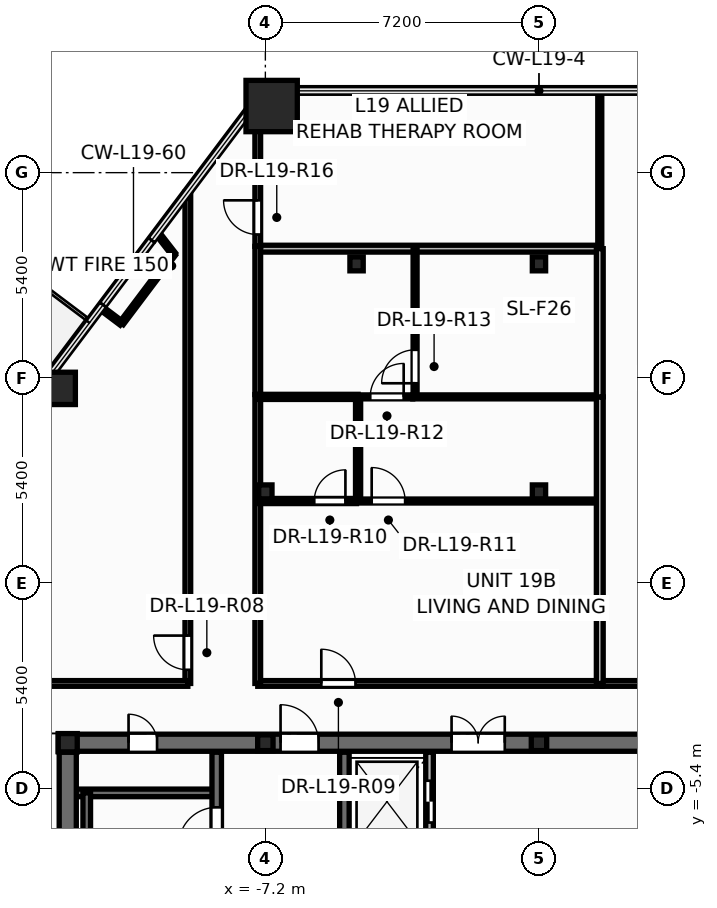
"""IFC4 building model, lengths in metres.
Left out: names, types, materials, properties, quantities, classifications, styles, units other than length and angle.
Written with IfcOpenShell. Run it as: python <this file> out.ifc"""

import sys

from ifc_helpers import new_model, si_unit, direction, frame, frame_2d, origin, origin_2d, place, context, subcontext, project, spatial, rectangle, hollow_rectangle, hollow_circle, i_section, extrude, element, fill, save


model = new_model("IFC4")
c1 = context("Model", 3, precision=1e-05, world=origin(), true_north=direction((0.0, 1.0)))
c2 = subcontext(c1, "Body", "Model", "MODEL_VIEW")
j1 = project(units=[si_unit("LENGTHUNIT", "METRE"), si_unit("PLANEANGLEUNIT", "RADIAN")], contexts=[c1])
p1 = place(None, origin())
s1 = spatial("IfcSite", under=j1, at=p1, CompositionType="ELEMENT")
p2 = place(p1, origin())
s2 = spatial("IfcBuilding", under=s1, at=p2, CompositionType="ELEMENT")
p3 = place(p2, frame((0.0, 0.0, 75.6)))
s3 = spatial("IfcBuildingStorey", under=s2, at=p3, CompositionType="ELEMENT", Elevation=75.6)
p4 = place(p3, frame((-7.034, 12.553, 0.0), z_axis=(0.0, 0.0, 1.0), x_axis=(1.0, 0.0, 0.0)))
e1 = element("IfcColumn", 1, at=p4, inside=s3, PredefinedType="COLUMN", context=c2, shape_type="SweptSolid", body=[
    extrude(hollow_rectangle(XDim=1.35, YDim=1.35, WallThickness=0.065, at=origin_2d()), origin(), (0.0, 0.0, 1.0), 3.6),
])
p5 = place(p3, frame((-12.624, 5.124, 0.0), z_axis=(0.0, 0.0, 1.0), x_axis=(1.0, 0.0, 0.0)))
e2 = element("IfcColumn", 2, at=p5, inside=s3, PredefinedType="COLUMN", context=c2, shape_type="SweptSolid", body=[
    extrude(hollow_circle(Radius=0.425, WallThickness=0.038, at=origin_2d()), origin(), (0.0, 0.0, 1.0), 3.6),
])
p6 = place(p3, frame((-12.4, -4.2, 0.0), z_axis=(0.0, 0.0, 1.0), x_axis=(1.0, 0.0, 0.0)))
e3 = element("IfcColumn", 3, at=p6, inside=s3, PredefinedType="COLUMN", context=c2, shape_type="SweptSolid", body=[
    extrude(i_section(OverallWidth=0.5, OverallDepth=0.482, WebThickness=0.04, FlangeThickness=0.045, at=origin_2d()), origin(), (0.0, 0.0, 1.0), 3.6),
])
for number, where, z_axis, x_axis in (
    (4, (-7.2, -4.2, 0.0), (0.0, 0.0, 1.0), (1.0, 0.0, 0.0)),
    (5, (0.0, -4.2, 0.0), (0.0, 0.0, 1.0), (1.0, 0.0, 0.0)),
):
    element("IfcColumn", number, at=place(p3, frame(where, z_axis=z_axis, x_axis=x_axis)), inside=s3, PredefinedType="PILASTER", context=c2, shape_type="SweptSolid", body=[
        extrude(i_section(OverallWidth=0.405, OverallDepth=0.414, WebThickness=0.022, FlangeThickness=0.032, at=origin_2d()), origin(), (0.0, 0.0, 1.0), 3.6),
    ])
for number, where, z_axis, x_axis in (
    (6, (-7.2, 2.4, 0.0), (0.0, 0.0, 1.0), (1.0, 0.0, 0.0)),
    (7, (0.0, 2.4, 0.0), (0.0, 0.0, 1.0), (1.0, 0.0, 0.0)),
    (8, (-4.8, 8.4, 0.0), (0.0, 0.0, 1.0), (1.0, 0.0, 0.0)),
    (9, (0.0, 8.4, 0.0), (0.0, 0.0, 1.0), (1.0, 0.0, 0.0)),
):
    element("IfcColumn", number, at=place(p3, frame(where, z_axis=z_axis, x_axis=x_axis)), inside=s3, PredefinedType="COLUMN", context=c2, shape_type="SweptSolid", body=[
        extrude(i_section(OverallWidth=0.35, OverallDepth=0.367, WebThickness=0.025, FlangeThickness=0.032, at=origin_2d()), origin(), (0.0, 0.0, 1.0), 3.6),
    ])
p7 = place(p3, frame((-12.65, -4.2, 0.0), z_axis=(0.0, 0.0, 1.0), x_axis=(1.0, 0.0, 0.0)))
e10 = element("IfcWall", 10, at=p7, inside=s3, PredefinedType="SHEAR", context=c2, shape_type="SweptSolid", body=[
    extrude(rectangle(XDim=25.3, YDim=0.45, at=frame_2d((12.65, 0.0))), origin(), (0.0, 0.0, 1.0), 3.6),
])
p8 = place(p7, frame((1.85, 0.0, 0.0)))
e11 = element("IfcOpeningElement", 11, at=p8, cuts=e10, PredefinedType="OPENING", context=c2, shape_type="SweptSolid", body=[
    extrude(rectangle(XDim=0.756, YDim=2.054, at=frame_2d((0.375, 1.027))), frame((0.0, 0.235, 0.0), z_axis=(0.0, -1.0, 0.0), x_axis=(1.0, 0.0, 0.0)), (0.0, 0.0, 1.0), 0.47),
])
p9 = place(p7, frame((21.85, 0.0, 0.0)))
e12 = element("IfcOpeningElement", 12, at=p9, cuts=e10, PredefinedType="OPENING", context=c2, shape_type="SweptSolid", body=[
    extrude(rectangle(XDim=0.756, YDim=2.054, at=frame_2d((0.375, 1.027))), frame((0.0, 0.235, 0.0), z_axis=(0.0, -1.0, 0.0), x_axis=(1.0, 0.0, 0.0)), (0.0, 0.0, 1.0), 0.47),
])
p10 = place(p7, frame((23.5, 0.0, 0.0)))
e13 = element("IfcOpeningElement", 13, at=p10, cuts=e10, PredefinedType="OPENING", context=c2, shape_type="SweptSolid", body=[
    extrude(rectangle(XDim=0.756, YDim=2.054, at=frame_2d((0.375, 1.027))), frame((0.0, 0.235, 0.0), z_axis=(0.0, -1.0, 0.0), x_axis=(1.0, 0.0, 0.0)), (0.0, 0.0, 1.0), 0.47),
])
p11 = place(p7, frame((5.85, 0.0, 0.0)))
e14 = element("IfcOpeningElement", 14, at=p11, cuts=e10, PredefinedType="OPENING", context=c2, shape_type="SweptSolid", body=[
    extrude(rectangle(XDim=1.006, YDim=2.104, at=frame_2d((0.5, 1.052))), frame((0.0, 0.235, 0.0), z_axis=(0.0, -1.0, 0.0), x_axis=(1.0, 0.0, 0.0)), (0.0, 0.0, 1.0), 0.47),
])
p12 = place(p7, frame((10.35, 0.0, 0.0)))
e15 = element("IfcOpeningElement", 15, at=p12, cuts=e10, PredefinedType="OPENING", context=c2, shape_type="SweptSolid", body=[
    extrude(rectangle(XDim=1.406, YDim=2.154, at=frame_2d((0.7, 1.077))), frame((0.0, 0.235, 0.0), z_axis=(0.0, -1.0, 0.0), x_axis=(1.0, 0.0, 0.0)), (0.0, 0.0, 1.0), 0.47),
])
p13 = place(p7, frame((18.45, 0.0, 0.0)))
e16 = element("IfcOpeningElement", 16, at=p13, cuts=e10, PredefinedType="OPENING", context=c2, shape_type="SweptSolid", body=[
    extrude(rectangle(XDim=1.006, YDim=2.104, at=frame_2d((0.5, 1.052))), frame((0.0, 0.235, 0.0), z_axis=(0.0, -1.0, 0.0), x_axis=(1.0, 0.0, 0.0)), (0.0, 0.0, 1.0), 0.47),
])
p14 = place(p3, frame((-12.35, -5.52, 0.0), z_axis=(0.0, 0.0, 1.0), x_axis=(1.0, 0.0, 0.0)))
e17 = element("IfcWall", 17, at=p14, inside=s3, PredefinedType="SOLIDWALL", context=c2, shape_type="SweptSolid", body=[
    extrude(rectangle(XDim=3.87, YDim=0.2, at=frame_2d((1.935, 0.0))), origin(), (0.0, 0.0, 1.0), 3.6),
])
p15 = place(p3, frame((-11.9, -13.1, 0.0), z_axis=(0.0, 0.0, 1.0), x_axis=(0.0, 1.0, 0.0)))
e18 = element("IfcWall", 18, at=p15, inside=s3, PredefinedType="SOLIDWALL", context=c2, shape_type="SweptSolid", body=[
    extrude(rectangle(XDim=7.58, YDim=0.2, at=frame_2d((3.79, 0.0))), origin(), (0.0, 0.0, 1.0), 3.6),
])
p16 = place(p3, frame((-8.48, -13.85, 0.0), z_axis=(0.0, 0.0, 1.0), x_axis=(0.0, 1.0, 0.0)))
e19 = element("IfcWall", 19, at=p16, inside=s3, PredefinedType="SHEAR", context=c2, shape_type="SweptSolid", body=[
    extrude(rectangle(XDim=9.4, YDim=0.25, at=frame_2d((4.7, 0.0))), origin(), (0.0, 0.0, 1.0), 3.6),
])
p17 = place(p16, frame((6.95, 0.0, 0.0)))
e20 = element("IfcOpeningElement", 20, at=p17, cuts=e19, PredefinedType="OPENING", context=c2, shape_type="SweptSolid", body=[
    extrude(rectangle(XDim=1.006, YDim=2.104, at=frame_2d((0.5, 1.052))), frame((0.0, 0.135, 0.0), z_axis=(0.0, -1.0, 0.0), x_axis=(1.0, 0.0, 0.0)), (0.0, 0.0, 1.0), 0.27),
])
p18 = place(p3, frame((-5.12, -13.85, 0.0), z_axis=(0.0, 0.0, 1.0), x_axis=(0.0, 1.0, 0.0)))
e21 = element("IfcWall", 21, at=p18, inside=s3, PredefinedType="SHEAR", context=c2, shape_type="SweptSolid", body=[
    extrude(rectangle(XDim=9.4, YDim=0.25, at=frame_2d((4.7, 0.0))), origin(), (0.0, 0.0, 1.0), 3.6),
])
p19 = place(p3, frame((-12.4, -13.85, 0.0), z_axis=(0.0, 0.0, 1.0), x_axis=(0.0, 1.0, 0.0)))
e22 = element("IfcWall", 22, at=p19, inside=s3, PredefinedType="SHEAR", context=c2, shape_type="SweptSolid", body=[
    extrude(rectangle(XDim=9.4, YDim=0.45, at=frame_2d((4.7, 0.0))), origin(), (0.0, 0.0, 1.0), 3.6),
])
p20 = place(p3, frame((-2.88, -9.45, 0.0), z_axis=(0.0, 0.0, 1.0), x_axis=(0.0, 1.0, 0.0)))
e23 = element("IfcWall", 23, at=p20, inside=s3, PredefinedType="SOLIDWALL", context=c2, shape_type="SweptSolid", body=[
    extrude(rectangle(XDim=5.0, YDim=0.2, at=frame_2d((2.5, 0.0))), origin(), (0.0, 0.0, 1.0), 3.35),
])
p21 = place(p20, frame((0.7, 0.0, 0.0)))
e24 = element("IfcOpeningElement", 24, at=p21, cuts=e23, PredefinedType="OPENING", context=c2, shape_type="SweptSolid", body=[
    extrude(rectangle(XDim=1.106, YDim=2.104, at=frame_2d((0.55, 1.052))), frame((0.0, 0.11, 0.0), z_axis=(0.0, -1.0, 0.0), x_axis=(1.0, 0.0, 0.0)), (0.0, 0.0, 1.0), 0.22),
])
p22 = place(p20, frame((3.15, 0.0, 0.0)))
e25 = element("IfcOpeningElement", 25, at=p22, cuts=e23, PredefinedType="OPENING", context=c2, shape_type="SweptSolid", body=[
    extrude(rectangle(XDim=1.106, YDim=2.104, at=frame_2d((0.55, 1.052))), frame((0.0, 0.11, 0.0), z_axis=(0.0, -1.0, 0.0), x_axis=(1.0, 0.0, 0.0)), (0.0, 0.0, 1.0), 0.22),
])
p23 = place(p3, frame((-9.24, -2.64, 0.0), z_axis=(0.0, 0.0, 1.0), x_axis=(0.0, 1.0, 0.0)))
e26 = element("IfcWall", 26, at=p23, inside=s3, PredefinedType="PARTITIONING", context=c2, shape_type="SweptSolid", body=[
    extrude(rectangle(XDim=12.927, YDim=0.15, at=frame_2d((6.463, 0.0))), origin(), (0.0, 0.0, 1.0), 2.509),
])
p24 = place(p23, frame((0.359, 0.0, 0.0)))
e27 = element("IfcOpeningElement", 27, at=p24, cuts=e26, PredefinedType="OPENING", context=c2, shape_type="SweptSolid", body=[
    extrude(rectangle(XDim=0.906, YDim=2.104, at=frame_2d((0.45, 1.052))), frame((0.0, 0.085, 0.0), z_axis=(0.0, -1.0, 0.0), x_axis=(1.0, 0.0, 0.0)), (0.0, 0.0, 1.0), 0.17),
])
p25 = place(p3, frame((-7.4, -2.64, 0.0), z_axis=(0.0, 0.0, 1.0), x_axis=(1.0, 0.0, 0.0)))
e28 = element("IfcWall", 28, at=p25, inside=s3, PredefinedType="PARTITIONING", context=c2, shape_type="SweptSolid", body=[
    extrude(rectangle(XDim=9.06, YDim=0.15, at=frame_2d((4.53, 0.0))), origin(), (0.0, 0.0, 1.0), 2.325),
])
p26 = place(p25, frame((1.672, 0.0, 0.0)))
e29 = element("IfcOpeningElement", 29, at=p26, cuts=e28, PredefinedType="OPENING", context=c2, shape_type="SweptSolid", body=[
    extrude(rectangle(XDim=0.906, YDim=2.104, at=frame_2d((0.45, 1.052))), frame((0.0, 0.085, 0.0), z_axis=(0.0, -1.0, 0.0), x_axis=(1.0, 0.0, 0.0)), (0.0, 0.0, 1.0), 0.17),
])
p27 = place(p3, frame((-4.8, 2.16, 0.0), z_axis=(0.0, 0.0, 1.0), x_axis=(1.0, 0.0, 0.0)))
e30 = element("IfcWall", 30, at=p27, inside=s3, PredefinedType="PARTITIONING", context=c2, shape_type="SweptSolid", body=[
    extrude(rectangle(XDim=6.4, YDim=0.105, at=frame_2d((3.2, 0.0))), origin(), (0.0, 0.0, 1.0), 2.325),
])
p28 = place(p27, frame((0.398, 0.0, 0.0)))
e31 = element("IfcOpeningElement", 31, at=p28, cuts=e30, PredefinedType="OPENING", context=c2, shape_type="SweptSolid", body=[
    extrude(rectangle(XDim=0.886, YDim=2.104, at=frame_2d((0.44, 1.052))), frame((0.0, 0.062, 0.0), z_axis=(0.0, -1.0, 0.0), x_axis=(1.0, 0.0, 0.0)), (0.0, 0.0, 1.0), 0.125),
])
p29 = place(p3, frame((1.662, -2.64, 0.0), z_axis=(0.0, 0.0, 1.0), x_axis=(1.0, 0.0, 0.0)))
e32 = element("IfcWall", 32, at=p29, inside=s3, PredefinedType="PARTITIONING", context=c2, shape_type="SweptSolid", body=[
    extrude(rectangle(XDim=6.178, YDim=0.15, at=frame_2d((3.089, 0.0))), origin(), (0.0, 0.0, 1.0), 2.325),
])
p30 = place(p3, frame((-14.64, -2.64, 0.0), z_axis=(0.0, 0.0, 1.0), x_axis=(1.0, 0.0, 0.0)))
e33 = element("IfcWall", 33, at=p30, inside=s3, PredefinedType="PARTITIONING", context=c2, shape_type="SweptSolid", body=[
    extrude(rectangle(XDim=5.4, YDim=0.15, at=frame_2d((2.7, 0.0))), origin(), (0.0, 0.0, 1.0), 3.35),
])
p31 = place(p3, frame((-3.32, 4.9, 0.0), z_axis=(0.0, 0.0, 1.0), x_axis=(1.0, 0.0, 0.0)))
e34 = element("IfcWall", 34, at=p31, inside=s3, PredefinedType="PARTITIONING", context=c2, shape_type="SweptSolid", body=[
    extrude(rectangle(XDim=4.92, YDim=0.105, at=frame_2d((2.46, 0.0))), origin(), (0.0, 0.0, 1.0), 2.325),
])
p32 = place(p3, frame((-7.4, 8.8, 0.0), z_axis=(0.0, 0.0, 1.0), x_axis=(1.0, 0.0, 0.0)))
e35 = element("IfcWall", 35, at=p32, inside=s3, PredefinedType="PARTITIONING", context=c2, shape_type="SweptSolid", body=[
    extrude(rectangle(XDim=9.0, YDim=0.18, at=frame_2d((4.5, 0.0))), origin(), (0.0, 0.0, 1.0), 2.509),
])
p33 = place(p3, frame((-7.4, -2.64, 0.0), z_axis=(0.0, 0.0, 1.0), x_axis=(0.0, 1.0, 0.0)))
e36 = element("IfcWall", 36, at=p33, inside=s3, PredefinedType="PARTITIONING", context=c2, shape_type="SweptSolid", body=[
    extrude(rectangle(XDim=7.6, YDim=0.15, at=frame_2d((3.8, 0.0))), origin(), (0.0, 0.0, 1.0), 2.325),
])
p34 = place(p3, frame((1.6, -2.64, 0.0), z_axis=(0.0, 0.0, 1.0), x_axis=(0.0, 1.0, 0.0)))
e37 = element("IfcWall", 37, at=p34, inside=s3, PredefinedType="PARTITIONING", context=c2, shape_type="SweptSolid", body=[
    extrude(rectangle(XDim=7.54, YDim=0.18, at=frame_2d((3.77, 0.0))), origin(), (0.0, 0.0, 1.0), 2.325),
])
p35 = place(p3, frame((1.6, 8.74, 0.0), z_axis=(0.0, 0.0, 1.0), x_axis=(0.0, 1.0, 0.0)))
e38 = element("IfcWall", 38, at=p35, inside=s3, PredefinedType="PARTITIONING", context=c2, shape_type="SweptSolid", body=[
    extrude(rectangle(XDim=4.213, YDim=0.105, at=frame_2d((2.106, 0.0))), origin(), (0.0, 0.0, 1.0), 2.713),
])
p36 = place(p3, frame((-7.4, 4.962, 0.0), z_axis=(0.0, 0.0, 1.0), x_axis=(0.0, 1.0, 0.0)))
e39 = element("IfcWall", 39, at=p36, inside=s3, PredefinedType="PARTITIONING", context=c2, shape_type="SweptSolid", body=[
    extrude(rectangle(XDim=3.898, YDim=0.15, at=frame_2d((1.949, 0.0))), origin(), (0.0, 0.0, 1.0), 2.509),
])
p37 = place(p3, frame((-7.4, 8.862, 0.0), z_axis=(0.0, 0.0, 1.0), x_axis=(0.0, 1.0, 0.0)))
e40 = element("IfcWall", 40, at=p37, inside=s3, PredefinedType="PARTITIONING", context=c2, shape_type="SweptSolid", body=[
    extrude(rectangle(XDim=3.87, YDim=0.15, at=frame_2d((1.935, 0.0))), origin(), (0.0, 0.0, 1.0), 2.713),
])
p38 = place(p37, frame((0.31, 0.0, 0.0)))
e41 = element("IfcOpeningElement", 41, at=p38, cuts=e40, PredefinedType="OPENING", context=c2, shape_type="SweptSolid", body=[
    extrude(rectangle(XDim=0.906, YDim=2.104, at=frame_2d((0.45, 1.052))), frame((0.0, 0.085, 0.0), z_axis=(0.0, -1.0, 0.0), x_axis=(1.0, 0.0, 0.0)), (0.0, 0.0, 1.0), 0.17),
])
p39 = place(p3, frame((-3.26, 4.9, 0.0), z_axis=(0.0, 0.0, 1.0), x_axis=(0.0, 1.0, 0.0)))
e42 = element("IfcWall", 42, at=p39, inside=s3, PredefinedType="PARTITIONING", context=c2, shape_type="SweptSolid", body=[
    extrude(rectangle(XDim=3.9, YDim=0.105, at=frame_2d((1.95, 0.0))), origin(), (0.0, 0.0, 1.0), 2.509),
])
p40 = place(p39, frame((0.358, 0.0, 0.0)))
e43 = element("IfcOpeningElement", 43, at=p40, cuts=e42, PredefinedType="OPENING", context=c2, shape_type="SweptSolid", body=[
    extrude(rectangle(XDim=0.886, YDim=2.104, at=frame_2d((0.44, 1.052))), frame((0.0, 0.062, 0.0), z_axis=(0.0, -1.0, 0.0), x_axis=(1.0, 0.0, 0.0)), (0.0, 0.0, 1.0), 0.125),
])
p41 = place(p3, frame((1.6, 4.9, 0.0), z_axis=(0.0, 0.0, 1.0), x_axis=(0.0, 1.0, 0.0)))
e44 = element("IfcWall", 44, at=p41, inside=s3, PredefinedType="PARTITIONING", context=c2, shape_type="SweptSolid", body=[
    extrude(rectangle(XDim=3.9, YDim=0.18, at=frame_2d((1.95, 0.0))), origin(), (0.0, 0.0, 1.0), 2.509),
])
p42 = place(p3, frame((-4.76, 2.16, 0.0), z_axis=(0.0, 0.0, 1.0), x_axis=(0.0, 1.0, 0.0)))
e45 = element("IfcWall", 45, at=p42, inside=s3, PredefinedType="PARTITIONING", context=c2, shape_type="SweptSolid", body=[
    extrude(rectangle(XDim=2.74, YDim=0.135, at=frame_2d((1.37, 0.0))), origin(), (0.0, 0.0, 1.0), 2.325),
])
p43 = place(p3, frame((-7.4, 2.16, 0.0), z_axis=(0.0, 0.0, 1.0), x_axis=(1.0, 0.0, 0.0)))
e46 = element("IfcWall", 46, at=p43, inside=s3, PredefinedType="PARTITIONING", context=c2, shape_type="SweptSolid", body=[
    extrude(rectangle(XDim=2.598, YDim=0.135, at=frame_2d((1.299, 0.0))), origin(), (0.0, 0.0, 1.0), 2.325),
])
p44 = place(p43, frame((1.487, 0.0, 0.0)))
e47 = element("IfcOpeningElement", 47, at=p44, cuts=e46, PredefinedType="OPENING", context=c2, shape_type="SweptSolid", body=[
    extrude(rectangle(XDim=0.826, YDim=2.104, at=frame_2d((0.41, 1.052))), frame((0.0, 0.078, 0.0), z_axis=(0.0, -1.0, 0.0), x_axis=(1.0, 0.0, 0.0)), (0.0, 0.0, 1.0), 0.155),
])
p45 = place(p3, frame((-7.4, 4.9, 0.0), z_axis=(0.0, 0.0, 1.0), x_axis=(1.0, 0.0, 0.0)))
e48 = element("IfcWall", 48, at=p45, inside=s3, PredefinedType="PARTITIONING", context=c2, shape_type="SweptSolid", body=[
    extrude(rectangle(XDim=2.64, YDim=0.135, at=frame_2d((1.32, 0.0))), origin(), (0.0, 0.0, 1.0), 2.509),
])
p46 = place(p3, frame((-9.615, 8.657, 0.0), z_axis=(0.0, 0.0, 1.0), x_axis=(-0.601301632327, -0.799022119194, 0.0)))
e49 = element("IfcWall", 49, at=p46, inside=s3, PredefinedType="PARTITIONING", context=c2, shape_type="SweptSolid", body=[
    extrude(rectangle(XDim=2.279, YDim=0.12, at=frame_2d((1.14, 0.0))), origin(), (0.0, 0.0, 1.0), 3.35),
])
p47 = place(p3, frame((-4.76, 4.9, 0.0), z_axis=(0.0, 0.0, 1.0), x_axis=(1.0, 0.0, 0.0)))
e50 = element("IfcWall", 50, at=p47, inside=s3, PredefinedType="PARTITIONING", context=c2, shape_type="SweptSolid", body=[
    extrude(rectangle(XDim=1.438, YDim=0.105, at=frame_2d((0.719, 0.0))), origin(), (0.0, 0.0, 1.0), 3.35),
])
p48 = place(p47, frame((0.32, 0.0, 0.0)))
e51 = element("IfcOpeningElement", 51, at=p48, cuts=e50, PredefinedType="OPENING", context=c2, shape_type="SweptSolid", body=[
    extrude(rectangle(XDim=0.886, YDim=2.104, at=frame_2d((0.44, 1.052))), frame((0.0, 0.062, 0.0), z_axis=(0.0, -1.0, 0.0), x_axis=(1.0, 0.0, 0.0)), (0.0, 0.0, 1.0), 0.125),
])
p49 = place(p3, frame((-10.041, 9.206, 0.0), z_axis=(0.0, 0.0, 1.0), x_axis=(0.613137094739, -0.789976520572, 0.0)))
e52 = element("IfcWall", 52, at=p49, inside=s3, PredefinedType="PARTITIONING", context=c2, shape_type="SweptSolid", body=[
    extrude(rectangle(XDim=0.694, YDim=0.12, at=frame_2d((0.347, 0.0))), origin(), (0.0, 0.0, 1.0), 2.713),
])
p50 = place(p3, frame((-10.986, 6.836, 0.0), z_axis=(0.0, 0.0, 1.0), x_axis=(-0.799080830747, 0.601223607265, 0.0)))
e53 = element("IfcWall", 53, at=p50, inside=s3, PredefinedType="PARTITIONING", context=c2, shape_type="SweptSolid", body=[
    extrude(rectangle(XDim=0.67, YDim=0.12, at=frame_2d((0.335, 0.0))), origin(), (0.0, 0.0, 1.0), 2.713),
])
p51 = place(p22, origin())
e54 = element("IfcDoor", 54, at=p51, inside=s3, OperationType="DOUBLE_DOOR_SLIDING", PredefinedType="DOOR", context=c2, shape_type="SweptSolid", body=[
    extrude(rectangle(XDim=1.1, YDim=2.1, at=frame_2d((0.55, 1.05))), frame((0.0, 0.025, 0.0), z_axis=(0.0, -1.0, 0.0), x_axis=(1.0, 0.0, 0.0)), (0.0, 0.0, 1.0), 0.05),
])
fill(e25, e54)
p52 = place(p17, origin())
e55 = element("IfcDoor", 55, at=p52, inside=s3, OperationType="SINGLE_SWING_LEFT", PredefinedType="DOOR", context=c2, shape_type="SweptSolid", body=[
    extrude(rectangle(XDim=1.0, YDim=2.1, at=frame_2d((0.5, 1.05))), frame((0.0, 0.025, 0.0), z_axis=(0.0, -1.0, 0.0), x_axis=(1.0, 0.0, 0.0)), (0.0, 0.0, 1.0), 0.05),
])
fill(e20, e55)
p53 = place(p8, origin())
e56 = element("IfcDoor", 56, at=p53, inside=s3, OperationType="SINGLE_SWING_LEFT", PredefinedType="DOOR", context=c2, shape_type="SweptSolid", body=[
    extrude(rectangle(XDim=0.75, YDim=2.05, at=frame_2d((0.375, 1.025))), frame((0.0, 0.025, 0.0), z_axis=(0.0, -1.0, 0.0), x_axis=(1.0, 0.0, 0.0)), (0.0, 0.0, 1.0), 0.05),
])
fill(e11, e56)
p54 = place(p11, origin())
e57 = element("IfcDoor", 57, at=p54, inside=s3, OperationType="SINGLE_SWING_LEFT", PredefinedType="DOOR", context=c2, shape_type="SweptSolid", body=[
    extrude(rectangle(XDim=1.0, YDim=2.1, at=frame_2d((0.5, 1.05))), frame((0.0, 0.025, 0.0), z_axis=(0.0, -1.0, 0.0), x_axis=(1.0, 0.0, 0.0)), (0.0, 0.0, 1.0), 0.05),
])
fill(e14, e57)
p55 = place(p12, origin())
e58 = element("IfcDoor", 58, at=p55, inside=s3, OperationType="DOUBLE_DOOR_SINGLE_SWING", PredefinedType="DOOR", context=c2, shape_type="SweptSolid", body=[
    extrude(rectangle(XDim=1.4, YDim=2.15, at=frame_2d((0.7, 1.075))), frame((0.0, 0.025, 0.0), z_axis=(0.0, -1.0, 0.0), x_axis=(1.0, 0.0, 0.0)), (0.0, 0.0, 1.0), 0.05),
])
fill(e15, e58)
p56 = place(p24, origin())
e59 = element("IfcDoor", 59, at=p56, inside=s3, OperationType="SINGLE_SWING_RIGHT", PredefinedType="DOOR", context=c2, shape_type="SweptSolid", body=[
    extrude(rectangle(XDim=0.9, YDim=2.1, at=frame_2d((0.45, 1.05))), frame((0.0, 0.025, 0.0), z_axis=(0.0, -1.0, 0.0), x_axis=(1.0, 0.0, 0.0)), (0.0, 0.0, 1.0), 0.05),
])
fill(e27, e59)
p57 = place(p26, origin())
e60 = element("IfcDoor", 60, at=p57, inside=s3, OperationType="SINGLE_SWING_LEFT", PredefinedType="DOOR", context=c2, shape_type="SweptSolid", body=[
    extrude(rectangle(XDim=0.9, YDim=2.1, at=frame_2d((0.45, 1.05))), frame((0.0, 0.025, 0.0), z_axis=(0.0, -1.0, 0.0), x_axis=(1.0, 0.0, 0.0)), (0.0, 0.0, 1.0), 0.05),
])
fill(e29, e60)
p58 = place(p44, origin())
e61 = element("IfcDoor", 61, at=p58, inside=s3, OperationType="SINGLE_SWING_RIGHT", PredefinedType="DOOR", context=c2, shape_type="SweptSolid", body=[
    extrude(rectangle(XDim=0.82, YDim=2.1, at=frame_2d((0.41, 1.05))), frame((0.0, 0.025, 0.0), z_axis=(0.0, -1.0, 0.0), x_axis=(1.0, 0.0, 0.0)), (0.0, 0.0, 1.0), 0.05),
])
fill(e47, e61)
p59 = place(p28, origin())
e62 = element("IfcDoor", 62, at=p59, inside=s3, OperationType="SINGLE_SWING_LEFT", PredefinedType="DOOR", context=c2, shape_type="SweptSolid", body=[
    extrude(rectangle(XDim=0.88, YDim=2.1, at=frame_2d((0.44, 1.05))), frame((0.0, 0.025, 0.0), z_axis=(0.0, -1.0, 0.0), x_axis=(1.0, 0.0, 0.0)), (0.0, 0.0, 1.0), 0.05),
])
fill(e31, e62)
p60 = place(p48, origin())
e63 = element("IfcDoor", 63, at=p60, inside=s3, OperationType="SINGLE_SWING_RIGHT", PredefinedType="DOOR", context=c2, shape_type="SweptSolid", body=[
    extrude(rectangle(XDim=0.88, YDim=2.1, at=frame_2d((0.44, 1.05))), frame((0.0, 0.025, 0.0), z_axis=(0.0, -1.0, 0.0), x_axis=(1.0, 0.0, 0.0)), (0.0, 0.0, 1.0), 0.05),
])
fill(e51, e63)
p61 = place(p40, origin())
e64 = element("IfcDoor", 64, at=p61, inside=s3, OperationType="SINGLE_SWING_LEFT", PredefinedType="DOOR", context=c2, shape_type="SweptSolid", body=[
    extrude(rectangle(XDim=0.88, YDim=2.1, at=frame_2d((0.44, 1.05))), frame((0.0, 0.025, 0.0), z_axis=(0.0, -1.0, 0.0), x_axis=(1.0, 0.0, 0.0)), (0.0, 0.0, 1.0), 0.05),
])
fill(e43, e64)
p62 = place(p38, origin())
e65 = element("IfcDoor", 65, at=p62, inside=s3, OperationType="SINGLE_SWING_RIGHT", PredefinedType="DOOR", context=c2, shape_type="SweptSolid", body=[
    extrude(rectangle(XDim=0.9, YDim=2.1, at=frame_2d((0.45, 1.05))), frame((0.0, 0.025, 0.0), z_axis=(0.0, -1.0, 0.0), x_axis=(1.0, 0.0, 0.0)), (0.0, 0.0, 1.0), 0.05),
])
fill(e41, e65)
save(model, sys.argv[1])
